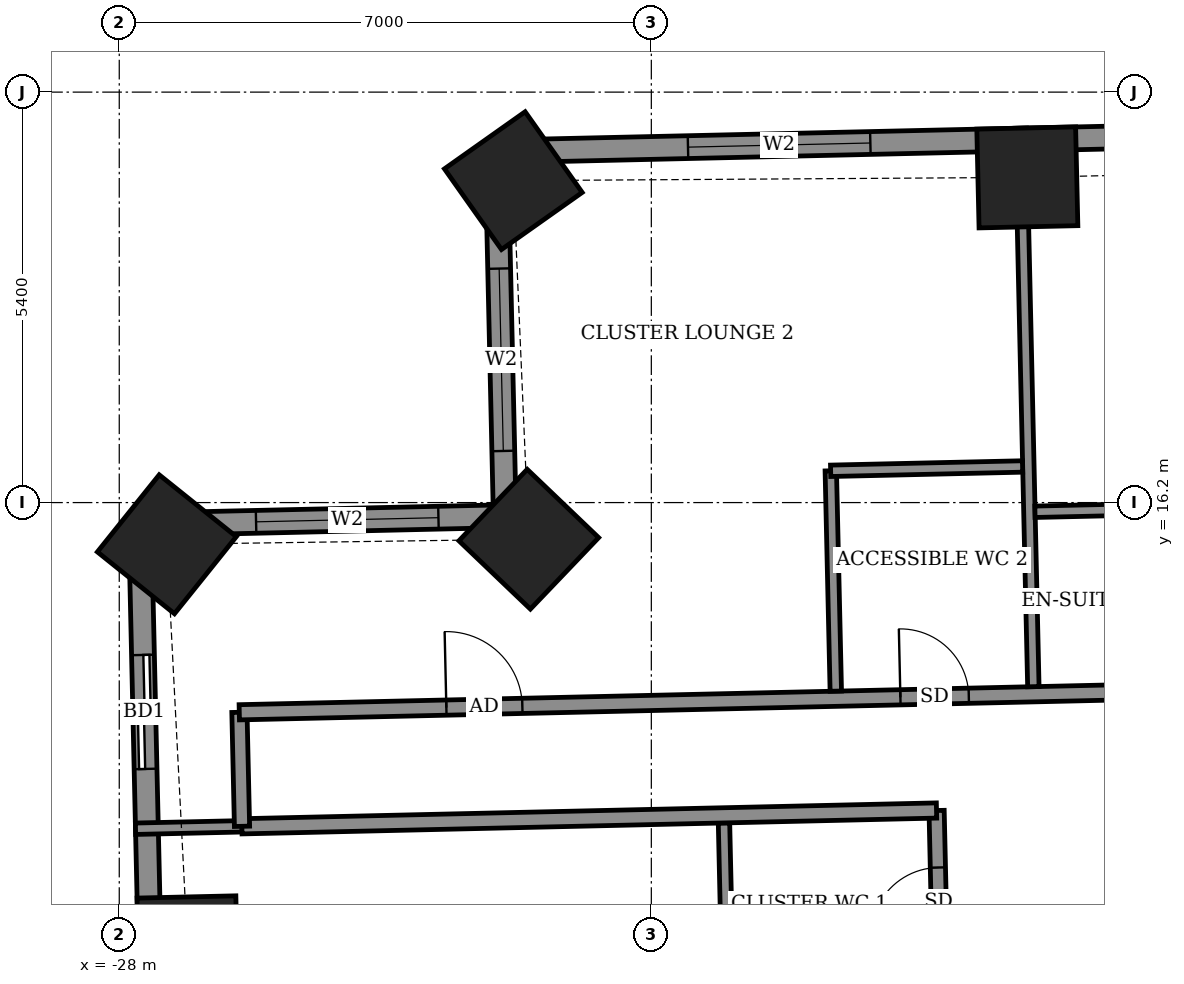
"""IFC4 building model, lengths in metres.
Left out: names, types, materials, properties, quantities, classifications, styles, units other than length and angle.
Written with IfcOpenShell. Run it as: python <this file> out.ifc"""

import sys

from ifc_helpers import new_model, si_unit, direction, frame, frame_2d, origin, origin_2d, place, context, subcontext, project, spatial, rectangle, extrude, element, fill, save


model = new_model("IFC4")
c1 = context("Model", 3, precision=1e-05, world=origin(), true_north=direction((0.0, 1.0)))
c2 = subcontext(c1, "Body", "Model", "MODEL_VIEW")
j1 = project(units=[si_unit("LENGTHUNIT", "METRE"), si_unit("PLANEANGLEUNIT", "RADIAN")], contexts=[c1])
p1 = place(None, origin())
s1 = spatial("IfcSite", under=j1, at=p1, CompositionType="ELEMENT")
p2 = place(p1, origin())
s2 = spatial("IfcBuilding", under=s1, at=p2, CompositionType="ELEMENT")
p3 = place(p2, frame((0.0, 0.0, 130.1)))
s3 = spatial("IfcBuildingStorey", under=s2, at=p3, CompositionType="ELEMENT", Elevation=130.1)
for number, where, z_axis, x_axis in (
    (1, (-16.053, 20.478, -0.55), (0.0, 0.0, 1.0), (-1.0, -0.023, 0.0)),
    (2, (-22.816, 20.435, -0.55), (0.0, 0.0, 1.0), (-0.816, -0.577, 0.0)),
    (3, (-22.612, 15.718, -0.55), (0.0, 0.0, 1.0), (-0.691, -0.723, 0.0)),
    (4, (-27.374, 15.651, -0.55), (0.0, 0.0, 1.0), (-0.626, -0.78, 0.0)),
    (5, (-27.101, 10.362, -0.55), (0.0, 0.0, 1.0), (0.023, -1.0, 0.0)),
):
    element("IfcColumn", number, at=place(p3, frame(where, z_axis=z_axis, x_axis=x_axis)), inside=s3, PredefinedType="COLUMN", context=c2, shape_type="SweptSolid", body=[
        extrude(rectangle(XDim=1.3, YDim=1.3, at=origin_2d()), origin(), (0.0, 0.0, 1.0), 3.6),
    ])
p4 = place(p3, frame((19.396, 21.782, 0.0), z_axis=(0.0, 0.0, 1.0), x_axis=(-0.999742636707, -0.022686126826, 0.0)))
e6 = element("IfcWall", 6, at=p4, inside=s3, PredefinedType="SOLIDWALL", context=c2, shape_type="SweptSolid", body=[
    extrude(rectangle(XDim=42.444, YDim=0.3, at=frame_2d((21.222, 0.0))), origin(), (0.0, 0.0, 1.0), 3.05),
])
p5 = place(p4, frame((1.982, 0.0, 0.0)))
e7 = element("IfcOpeningElement", 7, at=p5, cuts=e6, PredefinedType="OPENING", context=c2, shape_type="SweptSolid", body=[
    extrude(rectangle(XDim=1.5, YDim=2.4, at=frame_2d((0.75, 1.2))), frame((0.0, 0.16, 0.0), z_axis=(0.0, -1.0, 0.0), x_axis=(1.0, 0.0, 0.0)), (0.0, 0.0, 1.0), 0.32),
])
p6 = place(p4, frame((5.009, 0.0, 0.0)))
e8 = element("IfcOpeningElement", 8, at=p6, cuts=e6, PredefinedType="OPENING", context=c2, shape_type="SweptSolid", body=[
    extrude(rectangle(XDim=1.2, YDim=2.4, at=frame_2d((0.6, 1.2))), frame((0.0, 0.16, 0.0), z_axis=(0.0, -1.0, 0.0), x_axis=(1.0, 0.0, 0.0)), (0.0, 0.0, 1.0), 0.32),
])
p7 = place(p4, frame((10.394, 0.0, 0.0)))
e9 = element("IfcOpeningElement", 9, at=p7, cuts=e6, PredefinedType="OPENING", context=c2, shape_type="SweptSolid", body=[
    extrude(rectangle(XDim=1.5, YDim=2.4, at=frame_2d((0.75, 1.2))), frame((0.0, 0.16, 0.0), z_axis=(0.0, -1.0, 0.0), x_axis=(1.0, 0.0, 0.0)), (0.0, 0.0, 1.0), 0.32),
])
p8 = place(p4, frame((15.346, 0.0, 0.0)))
e10 = element("IfcOpeningElement", 10, at=p8, cuts=e6, PredefinedType="OPENING", context=c2, shape_type="SweptSolid", body=[
    extrude(rectangle(XDim=1.5, YDim=2.4, at=frame_2d((0.75, 1.2))), frame((0.0, 0.16, 0.0), z_axis=(0.0, -1.0, 0.0), x_axis=(1.0, 0.0, 0.0)), (0.0, 0.0, 1.0), 0.32),
])
p9 = place(p4, frame((18.508, 0.0, 0.0)))
e11 = element("IfcOpeningElement", 11, at=p9, cuts=e6, PredefinedType="OPENING", context=c2, shape_type="SweptSolid", body=[
    extrude(rectangle(XDim=1.5, YDim=2.4, at=frame_2d((0.75, 1.2))), frame((0.0, 0.16, 0.0), z_axis=(0.0, -1.0, 0.0), x_axis=(1.0, 0.0, 0.0)), (0.0, 0.0, 1.0), 0.32),
])
p10 = place(p4, frame((23.544, 0.0, 0.0)))
e12 = element("IfcOpeningElement", 12, at=p10, cuts=e6, PredefinedType="OPENING", context=c2, shape_type="SweptSolid", body=[
    extrude(rectangle(XDim=1.5, YDim=2.4, at=frame_2d((0.75, 1.2))), frame((0.0, 0.16, 0.0), z_axis=(0.0, -1.0, 0.0), x_axis=(1.0, 0.0, 0.0)), (0.0, 0.0, 1.0), 0.32),
])
p11 = place(p4, frame((29.195, 0.0, 0.0)))
e13 = element("IfcOpeningElement", 13, at=p11, cuts=e6, PredefinedType="OPENING", context=c2, shape_type="SweptSolid", body=[
    extrude(rectangle(XDim=1.5, YDim=2.4, at=frame_2d((0.75, 1.2))), frame((0.0, 0.16, 0.0), z_axis=(0.0, -1.0, 0.0), x_axis=(1.0, 0.0, 0.0)), (0.0, 0.0, 1.0), 0.32),
])
p12 = place(p4, frame((32.357, 0.0, 0.0)))
e14 = element("IfcOpeningElement", 14, at=p12, cuts=e6, PredefinedType="OPENING", context=c2, shape_type="SweptSolid", body=[
    extrude(rectangle(XDim=1.5, YDim=2.4, at=frame_2d((0.75, 1.2))), frame((0.0, 0.16, 0.0), z_axis=(0.0, -1.0, 0.0), x_axis=(1.0, 0.0, 0.0)), (0.0, 0.0, 1.0), 0.32),
])
p13 = place(p4, frame((37.524, 0.0, 0.9)))
e15 = element("IfcOpeningElement", 15, at=p13, cuts=e6, PredefinedType="OPENING", context=c2, shape_type="SweptSolid", body=[
    extrude(rectangle(XDim=2.4, YDim=1.5, at=frame_2d((1.2, 0.75))), frame((0.0, 0.16, 0.0), z_axis=(0.0, -1.0, 0.0), x_axis=(1.0, 0.0, 0.0)), (0.0, 0.0, 1.0), 0.32),
])
p14 = place(p3, frame((-23.037, 20.819, 0.0), z_axis=(0.0, 0.0, 1.0), x_axis=(0.022738738327, -0.999741441463, 0.0)))
e16 = element("IfcWall", 16, at=p14, inside=s3, PredefinedType="SOLIDWALL", context=c2, shape_type="SweptSolid", body=[
    extrude(rectangle(XDim=4.799, YDim=0.3, at=frame_2d((2.4, 0.0))), origin(), (0.0, 0.0, 1.0), 2.55),
])
p15 = place(p14, frame((1.541, 0.0, 0.9)))
e17 = element("IfcOpeningElement", 17, at=p15, cuts=e16, PredefinedType="OPENING", context=c2, shape_type="SweptSolid", body=[
    extrude(rectangle(XDim=2.4, YDim=1.5, at=frame_2d((1.2, 0.75))), frame((0.0, 0.16, 0.0), z_axis=(0.0, -1.0, 0.0), x_axis=(1.0, 0.0, 0.0)), (0.0, 0.0, 1.0), 0.32),
])
p16 = place(p3, frame((-22.928, 16.021, 0.0), z_axis=(0.0, 0.0, 1.0), x_axis=(-0.999742701292, -0.022683280499, 0.0)))
e18 = element("IfcWall", 18, at=p16, inside=s3, PredefinedType="SOLIDWALL", context=c2, shape_type="SweptSolid", body=[
    extrude(rectangle(XDim=4.8, YDim=0.3, at=frame_2d((2.4, 0.0))), origin(), (0.0, 0.0, 1.0), 2.55),
])
p17 = place(p16, frame((0.873, 0.0, 0.9)))
e19 = element("IfcOpeningElement", 19, at=p17, cuts=e18, PredefinedType="OPENING", context=c2, shape_type="SweptSolid", body=[
    extrude(rectangle(XDim=2.4, YDim=1.5, at=frame_2d((1.2, 0.75))), frame((0.0, 0.16, 0.0), z_axis=(0.0, -1.0, 0.0), x_axis=(1.0, 0.0, 0.0)), (0.0, 0.0, 1.0), 0.32),
])
p18 = place(p3, frame((-27.727, 15.912, 0.0), z_axis=(0.0, 0.0, 1.0), x_axis=(0.022690078929, -0.999742547018, 0.0)))
e20 = element("IfcWall", 20, at=p18, inside=s3, PredefinedType="SOLIDWALL", context=c2, shape_type="SweptSolid", body=[
    extrude(rectangle(XDim=11.33, YDim=0.3, at=frame_2d((5.665, 0.0))), origin(), (0.0, 0.0, 1.0), 3.05),
])
p19 = place(p18, frame((1.717, 0.0, 0.0)))
e21 = element("IfcOpeningElement", 21, at=p19, cuts=e20, PredefinedType="OPENING", context=c2, shape_type="SweptSolid", body=[
    extrude(rectangle(XDim=1.5, YDim=2.4, at=frame_2d((0.75, 1.2))), frame((0.0, 0.16, 0.0), z_axis=(0.0, -1.0, 0.0), x_axis=(1.0, 0.0, 0.0)), (0.0, 0.0, 1.0), 0.32),
])
p20 = place(p18, frame((6.544, 0.0, 0.9)))
e22 = element("IfcOpeningElement", 22, at=p20, cuts=e20, PredefinedType="OPENING", context=c2, shape_type="SweptSolid", body=[
    extrude(rectangle(XDim=1.2, YDim=1.5, at=frame_2d((0.6, 0.75))), frame((0.0, 0.16, 0.0), z_axis=(0.0, -1.0, 0.0), x_axis=(1.0, 0.0, 0.0)), (0.0, 0.0, 1.0), 0.32),
])
p21 = place(p18, frame((8.95, 0.0, 0.9)))
e23 = element("IfcOpeningElement", 23, at=p21, cuts=e20, PredefinedType="OPENING", context=c2, shape_type="SweptSolid", body=[
    extrude(rectangle(XDim=1.2, YDim=1.5, at=frame_2d((0.6, 0.75))), frame((0.0, 0.16, 0.0), z_axis=(0.0, -1.0, 0.0), x_axis=(1.0, 0.0, 0.0)), (0.0, 0.0, 1.0), 0.32),
])
p22 = place(p3, frame((-16.603, -16.218, 0.0), z_axis=(0.0, 0.0, 1.0), x_axis=(-0.022698146637, 0.999742363881, 0.0)))
e24 = element("IfcWall", 24, at=p22, inside=s3, PredefinedType="PARTITIONING", context=c2, shape_type="SweptSolid", body=[
    extrude(rectangle(XDim=28.374, YDim=0.2, at=frame_2d((14.187, 0.0))), origin(), (0.0, 0.0, 1.0), 3.05),
])
p23 = place(p22, frame((24.537, 0.0, 0.0)))
e25 = element("IfcOpeningElement", 25, at=p23, cuts=e24, PredefinedType="OPENING", context=c2, shape_type="SweptSolid", body=[
    extrude(rectangle(XDim=1.0, YDim=2.1, at=frame_2d((0.5, 1.05))), frame((0.0, 0.11, 0.0), z_axis=(0.0, -1.0, 0.0), x_axis=(1.0, 0.0, 0.0)), (0.0, 0.0, 1.0), 0.22),
])
p24 = place(p22, frame((26.724, 0.0, 0.0)))
e26 = element("IfcOpeningElement", 26, at=p24, cuts=e24, PredefinedType="OPENING", context=c2, shape_type="SweptSolid", body=[
    extrude(rectangle(XDim=0.9, YDim=2.1, at=frame_2d((0.45, 1.05))), frame((0.0, 0.11, 0.0), z_axis=(0.0, -1.0, 0.0), x_axis=(1.0, 0.0, 0.0)), (0.0, 0.0, 1.0), 0.22),
])
p25 = place(p22, frame((22.099, 0.0, 0.0)))
e27 = element("IfcOpeningElement", 27, at=p25, cuts=e24, PredefinedType="OPENING", context=c2, shape_type="SweptSolid", body=[
    extrude(rectangle(XDim=1.0, YDim=2.1, at=frame_2d((0.5, 1.05))), frame((0.0, 0.11, 0.0), z_axis=(0.0, -1.0, 0.0), x_axis=(1.0, 0.0, 0.0)), (0.0, 0.0, 1.0), 0.22),
])
p26 = place(p22, frame((16.324, 0.0, 0.0)))
e28 = element("IfcOpeningElement", 28, at=p26, cuts=e24, PredefinedType="OPENING", context=c2, shape_type="SweptSolid", body=[
    extrude(rectangle(XDim=1.0, YDim=2.1, at=frame_2d((0.5, 1.05))), frame((0.0, 0.11, 0.0), z_axis=(0.0, -1.0, 0.0), x_axis=(1.0, 0.0, 0.0)), (0.0, 0.0, 1.0), 0.22),
])
p27 = place(p22, frame((19.449, 0.0, 0.0)))
e29 = element("IfcOpeningElement", 29, at=p27, cuts=e24, PredefinedType="OPENING", context=c2, shape_type="SweptSolid", body=[
    extrude(rectangle(XDim=0.9, YDim=2.1, at=frame_2d((0.45, 1.05))), frame((0.0, 0.11, 0.0), z_axis=(0.0, -1.0, 0.0), x_axis=(1.0, 0.0, 0.0)), (0.0, 0.0, 1.0), 0.22),
])
p28 = place(p22, frame((13.574, 0.0, 0.0)))
e30 = element("IfcOpeningElement", 30, at=p28, cuts=e24, PredefinedType="OPENING", context=c2, shape_type="SweptSolid", body=[
    extrude(rectangle(XDim=1.0, YDim=2.1, at=frame_2d((0.5, 1.05))), frame((0.0, 0.11, 0.0), z_axis=(0.0, -1.0, 0.0), x_axis=(1.0, 0.0, 0.0)), (0.0, 0.0, 1.0), 0.22),
])
p29 = place(p22, frame((11.449, 0.0, 0.0)))
e31 = element("IfcOpeningElement", 31, at=p29, cuts=e24, PredefinedType="OPENING", context=c2, shape_type="SweptSolid", body=[
    extrude(rectangle(XDim=0.9, YDim=2.1, at=frame_2d((0.45, 1.05))), frame((0.0, 0.11, 0.0), z_axis=(0.0, -1.0, 0.0), x_axis=(1.0, 0.0, 0.0)), (0.0, 0.0, 1.0), 0.22),
])
p30 = place(p22, frame((8.524, 0.0, 0.0)))
e32 = element("IfcOpeningElement", 32, at=p30, cuts=e24, PredefinedType="OPENING", context=c2, shape_type="SweptSolid", body=[
    extrude(rectangle(XDim=1.0, YDim=2.1, at=frame_2d((0.5, 1.05))), frame((0.0, 0.11, 0.0), z_axis=(0.0, -1.0, 0.0), x_axis=(1.0, 0.0, 0.0)), (0.0, 0.0, 1.0), 0.22),
])
p31 = place(p22, frame((5.325, 0.0, 0.0)))
e33 = element("IfcOpeningElement", 33, at=p31, cuts=e24, PredefinedType="OPENING", context=c2, shape_type="SweptSolid", body=[
    extrude(rectangle(XDim=1.0, YDim=2.1, at=frame_2d((0.5, 1.05))), frame((0.0, 0.11, 0.0), z_axis=(0.0, -1.0, 0.0), x_axis=(1.0, 0.0, 0.0)), (0.0, 0.0, 1.0), 0.22),
])
p32 = place(p22, frame((2.85, 0.0, 0.0)))
e34 = element("IfcOpeningElement", 34, at=p32, cuts=e24, PredefinedType="OPENING", context=c2, shape_type="SweptSolid", body=[
    extrude(rectangle(XDim=1.0, YDim=2.1, at=frame_2d((0.5, 1.05))), frame((0.0, 0.11, 0.0), z_axis=(0.0, -1.0, 0.0), x_axis=(1.0, 0.0, 0.0)), (0.0, 0.0, 1.0), 0.22),
])
p33 = place(p22, frame((0.75, 0.0, 0.0)))
e35 = element("IfcOpeningElement", 35, at=p33, cuts=e24, PredefinedType="OPENING", context=c2, shape_type="SweptSolid", body=[
    extrude(rectangle(XDim=0.9, YDim=2.1, at=frame_2d((0.45, 1.05))), frame((0.0, 0.11, 0.0), z_axis=(0.0, -1.0, 0.0), x_axis=(1.0, 0.0, 0.0)), (0.0, 0.0, 1.0), 0.22),
])
p34 = place(p3, frame((-19.992, 9.686, 0.0), z_axis=(0.0, 0.0, 1.0), x_axis=(-0.022612884682, 0.999744296031, 0.0)))
e36 = element("IfcWall", 36, at=p34, inside=s3, PredefinedType="PARTITIONING", context=c2, shape_type="SweptSolid", body=[
    extrude(rectangle(XDim=2.3, YDim=0.15, at=frame_2d((1.15, 0.0))), origin(), (0.0, 0.0, 1.0), 3.05),
])
p35 = place(p3, frame((-27.786, 11.909, 0.0), z_axis=(0.0, 0.0, 1.0), x_axis=(0.999740216184, 0.022792545827, 0.0)))
e37 = element("IfcWall", 37, at=p35, inside=s3, PredefinedType="PARTITIONING", context=c2, shape_type="SweptSolid", body=[
    extrude(rectangle(XDim=1.403, YDim=0.15, at=frame_2d((0.702, 0.0))), origin(), (0.0, 0.0, 1.0), 2.55),
])
p36 = place(p3, frame((-26.387, 11.941, 0.0), z_axis=(0.0, 0.0, 1.0), x_axis=(0.999741076645, 0.022754772455, 0.0)))
e38 = element("IfcWall", 38, at=p36, inside=s3, PredefinedType="PARTITIONING", context=c2, shape_type="SweptSolid", body=[
    extrude(rectangle(XDim=9.141, YDim=0.2, at=frame_2d((4.571, 0.0))), origin(), (0.0, 0.0, 1.0), 3.05),
])
p37 = place(p3, frame((-26.385, 11.941, 0.0), z_axis=(0.0, 0.0, 1.0), x_axis=(-0.022617910375, 0.999744182344, 0.0)))
e39 = element("IfcWall", 39, at=p37, inside=s3, PredefinedType="PARTITIONING", context=c2, shape_type="SweptSolid", body=[
    extrude(rectangle(XDim=1.5, YDim=0.2, at=frame_2d((0.75, 0.0))), origin(), (0.0, 0.0, 1.0), 3.05),
])
p38 = place(p3, frame((-26.421, 13.441, 0.0), z_axis=(0.0, 0.0, 1.0), x_axis=(0.999742754064, 0.022680954485, 0.0)))
e40 = element("IfcWall", 40, at=p38, inside=s3, PredefinedType="PARTITIONING", context=c2, shape_type="SweptSolid", body=[
    extrude(rectangle(XDim=48.945, YDim=0.2, at=frame_2d((24.472, 0.0))), origin(), (0.0, 0.0, 1.0), 3.05),
])
p39 = place(p38, frame((46.647, 0.0, 0.0)))
e41 = element("IfcOpeningElement", 41, at=p39, cuts=e40, PredefinedType="OPENING", context=c2, shape_type="SweptSolid", body=[
    extrude(rectangle(XDim=1.0, YDim=2.1, at=frame_2d((0.5, 1.05))), frame((0.0, 0.11, 0.0), z_axis=(0.0, -1.0, 0.0), x_axis=(1.0, 0.0, 0.0)), (0.0, 0.0, 1.0), 0.22),
])
p40 = place(p38, frame((42.2, 0.0, 0.0)))
e42 = element("IfcOpeningElement", 42, at=p40, cuts=e40, PredefinedType="OPENING", context=c2, shape_type="SweptSolid", body=[
    extrude(rectangle(XDim=0.9, YDim=2.1, at=frame_2d((0.45, 1.05))), frame((0.0, 0.11, 0.0), z_axis=(0.0, -1.0, 0.0), x_axis=(1.0, 0.0, 0.0)), (0.0, 0.0, 1.0), 0.22),
])
p41 = place(p38, frame((39.925, 0.0, 0.0)))
e43 = element("IfcOpeningElement", 43, at=p41, cuts=e40, PredefinedType="OPENING", context=c2, shape_type="SweptSolid", body=[
    extrude(rectangle(XDim=0.9, YDim=2.1, at=frame_2d((0.45, 1.05))), frame((0.0, 0.11, 0.0), z_axis=(0.0, -1.0, 0.0), x_axis=(1.0, 0.0, 0.0)), (0.0, 0.0, 1.0), 0.22),
])
p42 = place(p38, frame((33.2, 0.0, 0.0)))
e44 = element("IfcOpeningElement", 44, at=p42, cuts=e40, PredefinedType="OPENING", context=c2, shape_type="SweptSolid", body=[
    extrude(rectangle(XDim=0.9, YDim=2.1, at=frame_2d((0.45, 1.05))), frame((0.0, 0.11, 0.0), z_axis=(0.0, -1.0, 0.0), x_axis=(1.0, 0.0, 0.0)), (0.0, 0.0, 1.0), 0.22),
])
p43 = place(p38, frame((31.25, 0.0, 0.0)))
e45 = element("IfcOpeningElement", 45, at=p43, cuts=e40, PredefinedType="OPENING", context=c2, shape_type="SweptSolid", body=[
    extrude(rectangle(XDim=0.9, YDim=2.1, at=frame_2d((0.45, 1.05))), frame((0.0, 0.11, 0.0), z_axis=(0.0, -1.0, 0.0), x_axis=(1.0, 0.0, 0.0)), (0.0, 0.0, 1.0), 0.22),
])
p44 = place(p38, frame((24.5, 0.0, 0.0)))
e46 = element("IfcOpeningElement", 46, at=p44, cuts=e40, PredefinedType="OPENING", context=c2, shape_type="SweptSolid", body=[
    extrude(rectangle(XDim=0.9, YDim=2.1, at=frame_2d((0.45, 1.05))), frame((0.0, 0.11, 0.0), z_axis=(0.0, -1.0, 0.0), x_axis=(1.0, 0.0, 0.0)), (0.0, 0.0, 1.0), 0.22),
])
p45 = place(p38, frame((22.45, 0.0, 0.0)))
e47 = element("IfcOpeningElement", 47, at=p45, cuts=e40, PredefinedType="OPENING", context=c2, shape_type="SweptSolid", body=[
    extrude(rectangle(XDim=0.9, YDim=2.1, at=frame_2d((0.45, 1.05))), frame((0.0, 0.11, 0.0), z_axis=(0.0, -1.0, 0.0), x_axis=(1.0, 0.0, 0.0)), (0.0, 0.0, 1.0), 0.22),
])
p46 = place(p38, frame((15.475, 0.0, 0.0)))
e48 = element("IfcOpeningElement", 48, at=p46, cuts=e40, PredefinedType="OPENING", context=c2, shape_type="SweptSolid", body=[
    extrude(rectangle(XDim=0.9, YDim=2.1, at=frame_2d((0.45, 1.05))), frame((0.0, 0.11, 0.0), z_axis=(0.0, -1.0, 0.0), x_axis=(1.0, 0.0, 0.0)), (0.0, 0.0, 1.0), 0.22),
])
p47 = place(p38, frame((13.4, 0.0, 0.0)))
e49 = element("IfcOpeningElement", 49, at=p47, cuts=e40, PredefinedType="OPENING", context=c2, shape_type="SweptSolid", body=[
    extrude(rectangle(XDim=0.9, YDim=2.1, at=frame_2d((0.45, 1.05))), frame((0.0, 0.11, 0.0), z_axis=(0.0, -1.0, 0.0), x_axis=(1.0, 0.0, 0.0)), (0.0, 0.0, 1.0), 0.22),
])
p48 = place(p38, frame((2.725, 0.0, 0.0)))
e50 = element("IfcOpeningElement", 50, at=p48, cuts=e40, PredefinedType="OPENING", context=c2, shape_type="SweptSolid", body=[
    extrude(rectangle(XDim=1.0, YDim=2.1, at=frame_2d((0.5, 1.05))), frame((0.0, 0.11, 0.0), z_axis=(0.0, -1.0, 0.0), x_axis=(1.0, 0.0, 0.0)), (0.0, 0.0, 1.0), 0.22),
])
p49 = place(p38, frame((8.7, 0.0, 0.0)))
e51 = element("IfcOpeningElement", 51, at=p49, cuts=e40, PredefinedType="OPENING", context=c2, shape_type="SweptSolid", body=[
    extrude(rectangle(XDim=0.9, YDim=2.1, at=frame_2d((0.45, 1.05))), frame((0.0, 0.11, 0.0), z_axis=(0.0, -1.0, 0.0), x_axis=(1.0, 0.0, 0.0)), (0.0, 0.0, 1.0), 0.22),
])
p50 = place(p3, frame((-18.573, 13.719, 0.0), z_axis=(0.0, 0.0, 1.0), x_axis=(-0.022732880677, 0.999741574676, 0.0)))
e52 = element("IfcWall", 52, at=p50, inside=s3, PredefinedType="PARTITIONING", context=c2, shape_type="SweptSolid", body=[
    extrude(rectangle(XDim=2.9, YDim=0.15, at=frame_2d((1.45, 0.0))), origin(), (0.0, 0.0, 1.0), 3.05),
])
p51 = place(p3, frame((-15.974, 13.778, 0.0), z_axis=(0.0, 0.0, 1.0), x_axis=(-0.022554648976, 0.999745611548, 0.0)))
e53 = element("IfcWall", 53, at=p51, inside=s3, PredefinedType="PARTITIONING", context=c2, shape_type="SweptSolid", body=[
    extrude(rectangle(XDim=7.35, YDim=0.15, at=frame_2d((3.675, 0.0))), origin(), (0.0, 0.0, 1.0), 3.05),
])
p52 = place(p3, frame((-15.953, 16.079, 0.0), z_axis=(0.0, 0.0, 1.0), x_axis=(0.999740260747, 0.02279059109, 0.0)))
e54 = element("IfcWall", 54, at=p52, inside=s3, PredefinedType="PARTITIONING", context=c2, shape_type="SweptSolid", body=[
    extrude(rectangle(XDim=2.324, YDim=0.15, at=frame_2d((1.162, 0.0))), origin(), (0.0, 0.0, 1.0), 3.05),
])
p53 = place(p3, frame((-18.641, 16.618, 0.0), z_axis=(0.0, 0.0, 1.0), x_axis=(0.999744175585, 0.022618209135, 0.0)))
e55 = element("IfcWall", 55, at=p53, inside=s3, PredefinedType="PARTITIONING", context=c2, shape_type="SweptSolid", body=[
    extrude(rectangle(XDim=2.526, YDim=0.15, at=frame_2d((1.263, 0.0))), origin(), (0.0, 0.0, 1.0), 3.05),
])
p54 = place(p13, origin())
e56 = element("IfcWindow", 56, at=p54, inside=s3, PartitioningType="DOUBLE_PANEL_VERTICAL", PredefinedType="WINDOW", context=c2, shape_type="SweptSolid", body=[
    extrude(rectangle(XDim=2.4, YDim=1.5, at=frame_2d((1.2, 0.75))), frame((0.0, 0.03, 0.0), z_axis=(0.0, -1.0, 0.0), x_axis=(1.0, 0.0, 0.0)), (0.0, 0.0, 1.0), 0.06),
])
fill(e15, e56)
p55 = place(p15, origin())
e57 = element("IfcWindow", 57, at=p55, inside=s3, PartitioningType="DOUBLE_PANEL_VERTICAL", PredefinedType="WINDOW", context=c2, shape_type="SweptSolid", body=[
    extrude(rectangle(XDim=2.4, YDim=1.5, at=frame_2d((1.2, 0.75))), frame((0.0, 0.03, 0.0), z_axis=(0.0, -1.0, 0.0), x_axis=(1.0, 0.0, 0.0)), (0.0, 0.0, 1.0), 0.06),
])
fill(e17, e57)
p56 = place(p17, origin())
e58 = element("IfcWindow", 58, at=p56, inside=s3, PartitioningType="DOUBLE_PANEL_VERTICAL", PredefinedType="WINDOW", context=c2, shape_type="SweptSolid", body=[
    extrude(rectangle(XDim=2.4, YDim=1.5, at=frame_2d((1.2, 0.75))), frame((0.0, 0.03, 0.0), z_axis=(0.0, -1.0, 0.0), x_axis=(1.0, 0.0, 0.0)), (0.0, 0.0, 1.0), 0.06),
])
fill(e19, e58)
p57 = place(p19, origin())
e59 = element("IfcDoor", 59, at=p57, inside=s3, OperationType="SLIDING_TO_LEFT", PredefinedType="DOOR", context=c2, shape_type="SweptSolid", body=[
    extrude(rectangle(XDim=1.5, YDim=2.4, at=frame_2d((0.75, 1.2))), frame((0.0, 0.025, 0.0), z_axis=(0.0, -1.0, 0.0), x_axis=(1.0, 0.0, 0.0)), (0.0, 0.0, 1.0), 0.05),
])
fill(e21, e59)
p58 = place(p48, origin())
e60 = element("IfcDoor", 60, at=p58, inside=s3, OperationType="SINGLE_SWING_LEFT", PredefinedType="DOOR", context=c2, shape_type="SweptSolid", body=[
    extrude(rectangle(XDim=1.0, YDim=2.1, at=frame_2d((0.5, 1.05))), frame((0.0, 0.025, 0.0), z_axis=(0.0, -1.0, 0.0), x_axis=(1.0, 0.0, 0.0)), (0.0, 0.0, 1.0), 0.05),
])
fill(e50, e60)
p59 = place(p49, origin())
e61 = element("IfcDoor", 61, at=p59, inside=s3, OperationType="SINGLE_SWING_RIGHT", PredefinedType="DOOR", context=c2, shape_type="SweptSolid", body=[
    extrude(rectangle(XDim=0.9, YDim=2.1, at=frame_2d((0.45, 1.05))), frame((0.0, 0.025, 0.0), z_axis=(0.0, -1.0, 0.0), x_axis=(1.0, 0.0, 0.0)), (0.0, 0.0, 1.0), 0.05),
])
fill(e51, e61)
p60 = place(p24, origin())
e62 = element("IfcDoor", 62, at=p60, inside=s3, OperationType="SINGLE_SWING_LEFT", PredefinedType="DOOR", context=c2, shape_type="SweptSolid", body=[
    extrude(rectangle(XDim=0.9, YDim=2.1, at=frame_2d((0.45, 1.05))), frame((0.0, 0.025, 0.0), z_axis=(0.0, -1.0, 0.0), x_axis=(1.0, 0.0, 0.0)), (0.0, 0.0, 1.0), 0.05),
])
fill(e26, e62)
save(model, sys.argv[1])
